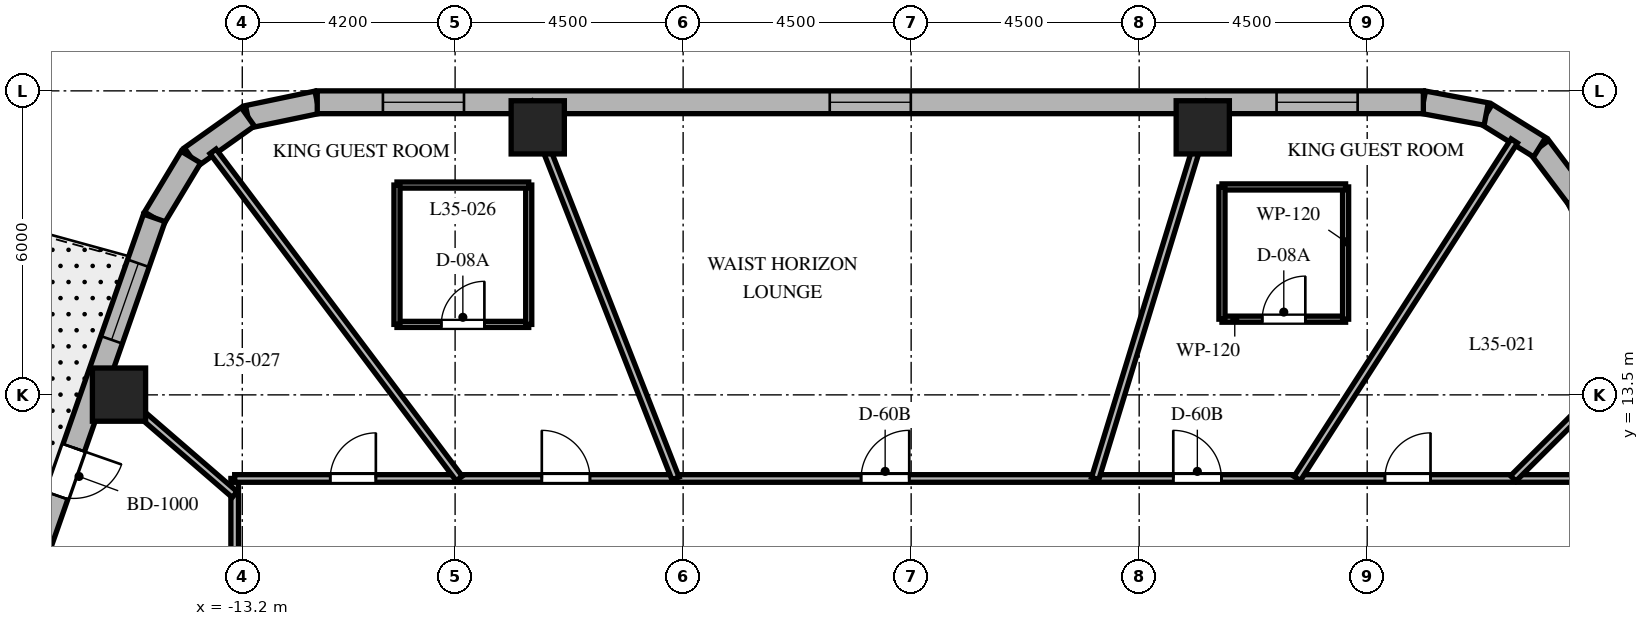
"""IFC4 building model, lengths in metres.
Left out: names, types, materials, properties, quantities, classifications, styles, units other than length and angle.
Written with IfcOpenShell. Run it as: python <this file> out.ifc"""

import sys

from ifc_helpers import new_model, si_unit, direction, frame, frame_2d, origin, origin_2d, place, context, subcontext, project, spatial, rectangle, extrude, element, fill, save


model = new_model("IFC4")
c1 = context("Model", 3, precision=1e-05, world=origin(), true_north=direction((0.0, 1.0)))
c2 = subcontext(c1, "Body", "Model", "MODEL_VIEW")
j1 = project(units=[si_unit("LENGTHUNIT", "METRE"), si_unit("PLANEANGLEUNIT", "RADIAN")], contexts=[c1])
p1 = place(None, origin())
s1 = spatial("IfcSite", under=j1, at=p1, CompositionType="ELEMENT")
p2 = place(p1, origin())
s2 = spatial("IfcBuilding", under=s1, at=p2, CompositionType="ELEMENT")
p3 = place(p2, frame((0.0, 0.0, 144.3)))
s3 = spatial("IfcBuildingStorey", under=s2, at=p3, CompositionType="ELEMENT", Elevation=144.3)
for number, where, z_axis, x_axis in (
    (1, (5.755, 18.78, 0.0), (0.0, 0.0, 1.0), (1.0, 0.0, 0.0)),
    (2, (-7.369, 18.78, 0.0), (0.0, 0.0, 1.0), (1.0, 0.0, 0.0)),
    (3, (-15.633, 13.505, 0.0), (0.0, 0.0, 1.0), (1.0, 0.0, 0.0)),
):
    element("IfcColumn", number, at=place(p3, frame(where, z_axis=z_axis, x_axis=x_axis)), inside=s3, PredefinedType="COLUMN", context=c2, shape_type="SweptSolid", body=[
        extrude(rectangle(XDim=1.05, YDim=1.05, at=origin_2d()), origin(), (0.0, 0.0, 1.0), 3.7),
    ])
p4 = place(p3, frame((13.162, 17.381, 0.0), z_axis=(0.0, 0.0, 1.0), x_axis=(-0.601515770517, 0.798860925205, 0.0)))
e4 = element("IfcWall", 4, at=p4, inside=s3, PredefinedType="SOLIDWALL", context=c2, shape_type="SweptSolid", body=[
    extrude(rectangle(XDim=1.262, YDim=0.45, at=frame_2d((0.631, 0.0))), origin(), (0.0, 0.0, 1.0), 3.4),
])
p5 = place(p3, frame((12.403, 18.389, 0.0), z_axis=(0.0, 0.0, 1.0), x_axis=(-0.849795170926, 0.527113049991, 0.0)))
e5 = element("IfcWall", 5, at=p5, inside=s3, PredefinedType="SOLIDWALL", context=c2, shape_type="SweptSolid", body=[
    extrude(rectangle(XDim=1.241, YDim=0.45, at=frame_2d((0.62, 0.0))), origin(), (0.0, 0.0, 1.0), 3.4),
])
p6 = place(p3, frame((11.349, 19.043, 0.0), z_axis=(0.0, 0.0, 1.0), x_axis=(-0.982931267051, 0.183973161772, 0.0)))
e6 = element("IfcWall", 6, at=p6, inside=s3, PredefinedType="SOLIDWALL", context=c2, shape_type="SweptSolid", body=[
    extrude(rectangle(XDim=1.262, YDim=0.45, at=frame_2d((0.631, 0.0))), origin(), (0.0, 0.0, 1.0), 3.4),
])
p7 = place(p3, frame((-11.72, 19.275, 0.0), z_axis=(0.0, 0.0, 1.0), x_axis=(-0.97893106758, -0.204191001093, 0.0)))
e7 = element("IfcWall", 7, at=p7, inside=s3, PredefinedType="SOLIDWALL", context=c2, shape_type="SweptSolid", body=[
    extrude(rectangle(XDim=1.4, YDim=0.45, at=frame_2d((0.7, 0.0))), origin(), (0.0, 0.0, 1.0), 3.4),
])
p8 = place(p3, frame((-13.091, 18.989, 0.0), z_axis=(0.0, 0.0, 1.0), x_axis=(-0.815574637848, -0.578651890258, 0.0)))
e8 = element("IfcWall", 8, at=p8, inside=s3, PredefinedType="SOLIDWALL", context=c2, shape_type="SweptSolid", body=[
    extrude(rectangle(XDim=1.377, YDim=0.45, at=frame_2d((0.688, 0.0))), origin(), (0.0, 0.0, 1.0), 3.4),
])
p9 = place(p3, frame((-14.214, 18.192, 0.0), z_axis=(0.0, 0.0, 1.0), x_axis=(-0.516340945502, -0.856383108193, 0.0)))
e9 = element("IfcWall", 9, at=p9, inside=s3, PredefinedType="SOLIDWALL", context=c2, shape_type="SweptSolid", body=[
    extrude(rectangle(XDim=1.4, YDim=0.45, at=frame_2d((0.7, 0.0))), origin(), (0.0, 0.0, 1.0), 3.4),
])
p10 = place(p3, frame((20.618, 2.344, 0.0), z_axis=(0.0, 0.0, 1.0), x_axis=(-0.444243691097, 0.895905990002, 0.0)))
e10 = element("IfcWall", 10, at=p10, inside=s3, PredefinedType="SOLIDWALL", context=c2, shape_type="SweptSolid", body=[
    extrude(rectangle(XDim=16.784, YDim=0.45, at=frame_2d((8.392, 0.0))), origin(), (0.0, 0.0, 1.0), 3.4),
])
p11 = place(p10, frame((4.535, 0.0, 0.0)))
e11 = element("IfcOpeningElement", 11, at=p11, cuts=e10, PredefinedType="OPENING", context=c2, shape_type="SweptSolid", body=[
    extrude(rectangle(XDim=1.0, YDim=2.15, at=frame_2d((0.5, 1.075))), frame((0.0, 0.235, 0.0), z_axis=(0.0, -1.0, 0.0), x_axis=(1.0, 0.0, 0.0)), (0.0, 0.0, 1.0), 0.47),
])
p12 = place(p10, frame((0.931, 0.0, 0.8)))
e12 = element("IfcOpeningElement", 12, at=p12, cuts=e10, PredefinedType="OPENING", context=c2, shape_type="SweptSolid", body=[
    extrude(rectangle(XDim=1.6, YDim=1.75, at=frame_2d((0.8, 0.875))), frame((0.0, 0.235, 0.0), z_axis=(0.0, -1.0, 0.0), x_axis=(1.0, 0.0, 0.0)), (0.0, 0.0, 1.0), 0.47),
])
p13 = place(p10, frame((6.25, 0.0, 0.8)))
e13 = element("IfcOpeningElement", 13, at=p13, cuts=e10, PredefinedType="OPENING", context=c2, shape_type="SweptSolid", body=[
    extrude(rectangle(XDim=1.6, YDim=1.75, at=frame_2d((0.8, 0.875))), frame((0.0, 0.235, 0.0), z_axis=(0.0, -1.0, 0.0), x_axis=(1.0, 0.0, 0.0)), (0.0, 0.0, 1.0), 0.47),
])
p14 = place(p10, frame((10.24, 0.0, 0.8)))
e14 = element("IfcOpeningElement", 14, at=p14, cuts=e10, PredefinedType="OPENING", context=c2, shape_type="SweptSolid", body=[
    extrude(rectangle(XDim=1.6, YDim=1.75, at=frame_2d((0.8, 0.875))), frame((0.0, 0.235, 0.0), z_axis=(0.0, -1.0, 0.0), x_axis=(1.0, 0.0, 0.0)), (0.0, 0.0, 1.0), 0.47),
])
p15 = place(p10, frame((14.303, 0.0, 0.8)))
e15 = element("IfcOpeningElement", 15, at=p15, cuts=e10, PredefinedType="OPENING", context=c2, shape_type="SweptSolid", body=[
    extrude(rectangle(XDim=1.6, YDim=1.75, at=frame_2d((0.8, 0.875))), frame((0.0, 0.235, 0.0), z_axis=(0.0, -1.0, 0.0), x_axis=(1.0, 0.0, 0.0)), (0.0, 0.0, 1.0), 0.47),
])
p16 = place(p3, frame((10.108, 19.275, 0.0), z_axis=(0.0, 0.0, 1.0), x_axis=(-1.0, 0.0, 0.0)))
e16 = element("IfcWall", 16, at=p16, inside=s3, PredefinedType="SOLIDWALL", context=c2, shape_type="SweptSolid", body=[
    extrude(rectangle(XDim=21.829, YDim=0.45, at=frame_2d((10.915, 0.0))), origin(), (0.0, 0.0, 1.0), 3.4),
])
p17 = place(p16, frame((1.297, 0.0, 0.8)))
e17 = element("IfcOpeningElement", 17, at=p17, cuts=e16, PredefinedType="OPENING", context=c2, shape_type="SweptSolid", body=[
    extrude(rectangle(XDim=1.6, YDim=1.75, at=frame_2d((0.8, 0.875))), frame((0.0, 0.235, 0.0), z_axis=(0.0, -1.0, 0.0), x_axis=(1.0, 0.0, 0.0)), (0.0, 0.0, 1.0), 0.47),
])
p18 = place(p16, frame((10.115, 0.0, 0.8)))
e18 = element("IfcOpeningElement", 18, at=p18, cuts=e16, PredefinedType="OPENING", context=c2, shape_type="SweptSolid", body=[
    extrude(rectangle(XDim=1.6, YDim=1.75, at=frame_2d((0.8, 0.875))), frame((0.0, 0.235, 0.0), z_axis=(0.0, -1.0, 0.0), x_axis=(1.0, 0.0, 0.0)), (0.0, 0.0, 1.0), 0.47),
])
p19 = place(p16, frame((18.933, 0.0, 0.8)))
e19 = element("IfcOpeningElement", 19, at=p19, cuts=e16, PredefinedType="OPENING", context=c2, shape_type="SweptSolid", body=[
    extrude(rectangle(XDim=1.6, YDim=1.75, at=frame_2d((0.8, 0.875))), frame((0.0, 0.235, 0.0), z_axis=(0.0, -1.0, 0.0), x_axis=(1.0, 0.0, 0.0)), (0.0, 0.0, 1.0), 0.47),
])
p20 = place(p3, frame((-14.937, 16.993, 0.0), z_axis=(0.0, 0.0, 1.0), x_axis=(-0.330431575061, -0.943829949834, 0.0)))
e20 = element("IfcWall", 20, at=p20, inside=s3, PredefinedType="SOLIDWALL", context=c2, shape_type="SweptSolid", body=[
    extrude(rectangle(XDim=17.689, YDim=0.45, at=frame_2d((8.844, 0.0))), origin(), (0.0, 0.0, 1.0), 3.4),
])
p21 = place(p20, frame((4.807, 0.0, 0.0)))
e21 = element("IfcOpeningElement", 21, at=p21, cuts=e20, PredefinedType="OPENING", context=c2, shape_type="SweptSolid", body=[
    extrude(rectangle(XDim=1.0, YDim=2.15, at=frame_2d((0.5, 1.075))), frame((0.0, 0.235, 0.0), z_axis=(0.0, -1.0, 0.0), x_axis=(1.0, 0.0, 0.0)), (0.0, 0.0, 1.0), 0.47),
])
p22 = place(p20, frame((0.95, 0.0, 0.8)))
e22 = element("IfcOpeningElement", 22, at=p22, cuts=e20, PredefinedType="OPENING", context=c2, shape_type="SweptSolid", body=[
    extrude(rectangle(XDim=1.6, YDim=1.75, at=frame_2d((0.8, 0.875))), frame((0.0, 0.235, 0.0), z_axis=(0.0, -1.0, 0.0), x_axis=(1.0, 0.0, 0.0)), (0.0, 0.0, 1.0), 0.47),
])
p23 = place(p20, frame((7.99, 0.0, 0.8)))
e23 = element("IfcOpeningElement", 23, at=p23, cuts=e20, PredefinedType="OPENING", context=c2, shape_type="SweptSolid", body=[
    extrude(rectangle(XDim=1.6, YDim=1.75, at=frame_2d((0.8, 0.875))), frame((0.0, 0.235, 0.0), z_axis=(0.0, -1.0, 0.0), x_axis=(1.0, 0.0, 0.0)), (0.0, 0.0, 1.0), 0.47),
])
p24 = place(p20, frame((15.084, 0.0, 0.8)))
e24 = element("IfcOpeningElement", 24, at=p24, cuts=e20, PredefinedType="OPENING", context=c2, shape_type="SweptSolid", body=[
    extrude(rectangle(XDim=1.6, YDim=1.75, at=frame_2d((0.8, 0.875))), frame((0.0, 0.235, 0.0), z_axis=(0.0, -1.0, 0.0), x_axis=(1.0, 0.0, 0.0)), (0.0, 0.0, 1.0), 0.47),
])
p25 = place(p3, frame((-13.35, -11.85, 0.0), z_axis=(0.0, 0.0, 1.0), x_axis=(0.0, 1.0, 0.0)))
e25 = element("IfcWall", 25, at=p25, inside=s3, PredefinedType="PARTITIONING", context=c2, shape_type="SweptSolid", body=[
    extrude(rectangle(XDim=23.7, YDim=0.15, at=frame_2d((11.85, 0.0))), origin(), (0.0, 0.0, 1.0), 2.84),
])
p26 = place(p25, frame((18.389, 0.0, 0.0)))
e26 = element("IfcOpeningElement", 26, at=p26, cuts=e25, PredefinedType="OPENING", context=c2, shape_type="SweptSolid", body=[
    extrude(rectangle(XDim=0.95, YDim=2.03, at=frame_2d((0.475, 1.015))), frame((0.0, 0.085, 0.0), z_axis=(0.0, -1.0, 0.0), x_axis=(1.0, 0.0, 0.0)), (0.0, 0.0, 1.0), 0.17),
])
p27 = place(p25, frame((12.315, 0.0, 0.0)))
e27 = element("IfcOpeningElement", 27, at=p27, cuts=e25, PredefinedType="OPENING", context=c2, shape_type="SweptSolid", body=[
    extrude(rectangle(XDim=0.9, YDim=2.03, at=frame_2d((0.45, 1.015))), frame((0.0, 0.085, 0.0), z_axis=(0.0, -1.0, 0.0), x_axis=(1.0, 0.0, 0.0)), (0.0, 0.0, 1.0), 0.17),
])
p28 = place(p25, frame((9.27, 0.0, 0.0)))
e28 = element("IfcOpeningElement", 28, at=p28, cuts=e25, PredefinedType="OPENING", context=c2, shape_type="SweptSolid", body=[
    extrude(rectangle(XDim=0.9, YDim=2.03, at=frame_2d((0.45, 1.015))), frame((0.0, 0.085, 0.0), z_axis=(0.0, -1.0, 0.0), x_axis=(1.0, 0.0, 0.0)), (0.0, 0.0, 1.0), 0.17),
])
p29 = place(p25, frame((3.765, 0.0, 0.0)))
e29 = element("IfcOpeningElement", 29, at=p29, cuts=e25, PredefinedType="OPENING", context=c2, shape_type="SweptSolid", body=[
    extrude(rectangle(XDim=0.9, YDim=2.03, at=frame_2d((0.45, 1.015))), frame((0.0, 0.085, 0.0), z_axis=(0.0, -1.0, 0.0), x_axis=(1.0, 0.0, 0.0)), (0.0, 0.0, 1.0), 0.17),
])
p30 = place(p3, frame((-13.35, 11.85, 0.0), z_axis=(0.0, 0.0, 1.0), x_axis=(1.0, 0.0, 0.0)))
e30 = element("IfcWall", 30, at=p30, inside=s3, PredefinedType="PARTITIONING", context=c2, shape_type="SweptSolid", body=[
    extrude(rectangle(XDim=26.7, YDim=0.15, at=frame_2d((13.35, 0.0))), origin(), (0.0, 0.0, 1.0), 2.84),
])
p31 = place(p30, frame((22.7, 0.0, 0.0)))
e31 = element("IfcOpeningElement", 31, at=p31, cuts=e30, PredefinedType="OPENING", context=c2, shape_type="SweptSolid", body=[
    extrude(rectangle(XDim=0.9, YDim=2.03, at=frame_2d((0.45, 1.015))), frame((0.0, 0.085, 0.0), z_axis=(0.0, -1.0, 0.0), x_axis=(1.0, 0.0, 0.0)), (0.0, 0.0, 1.0), 0.17),
])
p32 = place(p30, frame((18.523, 0.0, 0.0)))
e32 = element("IfcOpeningElement", 32, at=p32, cuts=e30, PredefinedType="OPENING", context=c2, shape_type="SweptSolid", body=[
    extrude(rectangle(XDim=0.95, YDim=2.03, at=frame_2d((0.475, 1.015))), frame((0.0, 0.085, 0.0), z_axis=(0.0, -1.0, 0.0), x_axis=(1.0, 0.0, 0.0)), (0.0, 0.0, 1.0), 0.17),
])
p33 = place(p30, frame((12.362, 0.0, 0.0)))
e33 = element("IfcOpeningElement", 33, at=p33, cuts=e30, PredefinedType="OPENING", context=c2, shape_type="SweptSolid", body=[
    extrude(rectangle(XDim=0.95, YDim=2.03, at=frame_2d((0.475, 1.015))), frame((0.0, 0.085, 0.0), z_axis=(0.0, -1.0, 0.0), x_axis=(1.0, 0.0, 0.0)), (0.0, 0.0, 1.0), 0.17),
])
p34 = place(p30, frame((6.061, 0.0, 0.0)))
e34 = element("IfcOpeningElement", 34, at=p34, cuts=e30, PredefinedType="OPENING", context=c2, shape_type="SweptSolid", body=[
    extrude(rectangle(XDim=0.95, YDim=2.03, at=frame_2d((0.475, 1.015))), frame((0.0, 0.085, 0.0), z_axis=(0.0, -1.0, 0.0), x_axis=(1.0, 0.0, 0.0)), (0.0, 0.0, 1.0), 0.17),
])
p35 = place(p30, frame((1.886, 0.0, 0.0)))
e35 = element("IfcOpeningElement", 35, at=p35, cuts=e30, PredefinedType="OPENING", context=c2, shape_type="SweptSolid", body=[
    extrude(rectangle(XDim=0.9, YDim=2.03, at=frame_2d((0.45, 1.015))), frame((0.0, 0.085, 0.0), z_axis=(0.0, -1.0, 0.0), x_axis=(1.0, 0.0, 0.0)), (0.0, 0.0, 1.0), 0.17),
])
p36 = place(p3, frame((11.882, 11.85, 0.0), z_axis=(0.0, 0.0, 1.0), x_axis=(0.708037373639, 0.706174962407, 0.0)))
e36 = element("IfcWall", 36, at=p36, inside=s3, PredefinedType="PARTITIONING", context=c2, shape_type="SweptSolid", body=[
    extrude(rectangle(XDim=3.802, YDim=0.15, at=frame_2d((1.901, 0.0))), origin(), (0.0, 0.0, 1.0), 2.64),
])
p37 = place(p3, frame((7.619, 11.85, 0.0), z_axis=(0.0, 0.0, 1.0), x_axis=(0.540829263478, 0.841132396098, 0.0)))
e37 = element("IfcWall", 37, at=p37, inside=s3, PredefinedType="PARTITIONING", context=c2, shape_type="SweptSolid", body=[
    extrude(rectangle(XDim=7.919, YDim=0.15, at=frame_2d((3.959, 0.0))), origin(), (0.0, 0.0, 1.0), 2.64),
])
p38 = place(p3, frame((3.631, 11.85, 0.0), z_axis=(0.0, 0.0, 1.0), x_axis=(0.293007573338, 0.956110120209, 0.0)))
e38 = element("IfcWall", 38, at=p38, inside=s3, PredefinedType="PARTITIONING", context=c2, shape_type="SweptSolid", body=[
    extrude(rectangle(XDim=7.766, YDim=0.15, at=frame_2d((3.883, 0.0))), origin(), (0.0, 0.0, 1.0), 2.64),
])
p39 = place(p3, frame((-4.65, 11.85, 0.0), z_axis=(0.0, 0.0, 1.0), x_axis=(-0.365265947993, 0.930903210456, 0.0)))
e39 = element("IfcWall", 39, at=p39, inside=s3, PredefinedType="PARTITIONING", context=c2, shape_type="SweptSolid", body=[
    extrude(rectangle(XDim=7.976, YDim=0.15, at=frame_2d((3.988, 0.0))), origin(), (0.0, 0.0, 1.0), 2.64),
])
p40 = place(p3, frame((-8.918, 11.85, 0.0), z_axis=(0.0, 0.0, 1.0), x_axis=(-0.601347965064, 0.798987249531, 0.0)))
e40 = element("IfcWall", 40, at=p40, inside=s3, PredefinedType="PARTITIONING", context=c2, shape_type="SweptSolid", body=[
    extrude(rectangle(XDim=8.08, YDim=0.15, at=frame_2d((4.04, 0.0))), origin(), (0.0, 0.0, 1.0), 2.64),
])
p41 = place(p3, frame((-13.35, 11.533, 0.0), z_axis=(0.0, 0.0, 1.0), x_axis=(-0.756711647314, 0.65374879183, 0.0)))
e41 = element("IfcWall", 41, at=p41, inside=s3, PredefinedType="PARTITIONING", context=c2, shape_type="SweptSolid", body=[
    extrude(rectangle(XDim=3.55, YDim=0.15, at=frame_2d((1.775, 0.0))), origin(), (0.0, 0.0, 1.0), 2.64),
])
p42 = place(p3, frame((6.134, 14.994, 0.0), z_axis=(0.0, 0.0, 1.0), x_axis=(1.0, 0.0, 0.0)))
e42 = element("IfcWall", 42, at=p42, inside=s3, PredefinedType="PARTITIONING", context=c2, shape_type="SweptSolid", body=[
    extrude(rectangle(XDim=2.44, YDim=0.12, at=frame_2d((1.22, 0.0))), origin(), (0.0, 0.0, 1.0), 3.4),
])
p43 = place(p42, frame((0.795, 0.0, 0.0)))
e43 = element("IfcOpeningElement", 43, at=p43, cuts=e42, PredefinedType="OPENING", context=c2, shape_type="SweptSolid", body=[
    extrude(rectangle(XDim=0.85, YDim=2.03, at=frame_2d((0.425, 1.015))), frame((0.0, 0.07, 0.0), z_axis=(0.0, -1.0, 0.0), x_axis=(1.0, 0.0, 0.0)), (0.0, 0.0, 1.0), 0.14),
])
p44 = place(p3, frame((8.574, 14.994, 0.0), z_axis=(0.0, 0.0, 1.0), x_axis=(0.0, 1.0, 0.0)))
e44 = element("IfcWall", 44, at=p44, inside=s3, PredefinedType="PARTITIONING", context=c2, shape_type="SweptSolid", body=[
    extrude(rectangle(XDim=2.61, YDim=0.12, at=frame_2d((1.305, 0.0))), origin(), (0.0, 0.0, 1.0), 2.64),
])
p45 = place(p3, frame((8.574, 17.604, 0.0), z_axis=(0.0, 0.0, 1.0), x_axis=(-1.0, 0.0, 0.0)))
e45 = element("IfcWall", 45, at=p45, inside=s3, PredefinedType="PARTITIONING", context=c2, shape_type="SweptSolid", body=[
    extrude(rectangle(XDim=2.44, YDim=0.12, at=frame_2d((1.22, 0.0))), origin(), (0.0, 0.0, 1.0), 2.64),
])
p46 = place(p3, frame((6.134, 17.604, 0.0), z_axis=(0.0, 0.0, 1.0), x_axis=(0.0, -1.0, 0.0)))
e46 = element("IfcWall", 46, at=p46, inside=s3, PredefinedType="PARTITIONING", context=c2, shape_type="SweptSolid", body=[
    extrude(rectangle(XDim=2.61, YDim=0.12, at=frame_2d((1.305, 0.0))), origin(), (0.0, 0.0, 1.0), 3.4),
])
p47 = place(p3, frame((-10.147, 14.891, 0.0), z_axis=(0.0, 0.0, 1.0), x_axis=(1.0, 0.0, 0.0)))
e47 = element("IfcWall", 47, at=p47, inside=s3, PredefinedType="PARTITIONING", context=c2, shape_type="SweptSolid", body=[
    extrude(rectangle(XDim=2.6, YDim=0.12, at=frame_2d((1.3, 0.0))), origin(), (0.0, 0.0, 1.0), 2.84),
])
p48 = place(p47, frame((0.875, 0.0, 0.0)))
e48 = element("IfcOpeningElement", 48, at=p48, cuts=e47, PredefinedType="OPENING", context=c2, shape_type="SweptSolid", body=[
    extrude(rectangle(XDim=0.85, YDim=2.03, at=frame_2d((0.425, 1.015))), frame((0.0, 0.07, 0.0), z_axis=(0.0, -1.0, 0.0), x_axis=(1.0, 0.0, 0.0)), (0.0, 0.0, 1.0), 0.14),
])
p49 = place(p3, frame((-7.547, 14.891, 0.0), z_axis=(0.0, 0.0, 1.0), x_axis=(0.0, 1.0, 0.0)))
e49 = element("IfcWall", 49, at=p49, inside=s3, PredefinedType="PARTITIONING", context=c2, shape_type="SweptSolid", body=[
    extrude(rectangle(XDim=2.75, YDim=0.12, at=frame_2d((1.375, 0.0))), origin(), (0.0, 0.0, 1.0), 2.84),
])
p50 = place(p3, frame((-7.547, 17.641, 0.0), z_axis=(0.0, 0.0, 1.0), x_axis=(-1.0, 0.0, 0.0)))
e50 = element("IfcWall", 50, at=p50, inside=s3, PredefinedType="PARTITIONING", context=c2, shape_type="SweptSolid", body=[
    extrude(rectangle(XDim=2.6, YDim=0.12, at=frame_2d((1.3, 0.0))), origin(), (0.0, 0.0, 1.0), 2.64),
])
p51 = place(p3, frame((-10.147, 17.641, 0.0), z_axis=(0.0, 0.0, 1.0), x_axis=(0.0, -1.0, 0.0)))
e51 = element("IfcWall", 51, at=p51, inside=s3, PredefinedType="PARTITIONING", context=c2, shape_type="SweptSolid", body=[
    extrude(rectangle(XDim=2.75, YDim=0.12, at=frame_2d((1.375, 0.0))), origin(), (0.0, 0.0, 1.0), 2.64),
])
p52 = place(p17, origin())
e52 = element("IfcWindow", 52, at=p52, inside=s3, PartitioningType="SINGLE_PANEL", PredefinedType="WINDOW", context=c2, shape_type="SweptSolid", body=[
    extrude(rectangle(XDim=1.6, YDim=1.75, at=frame_2d((0.8, 0.875))), frame((0.0, 0.03, 0.0), z_axis=(0.0, -1.0, 0.0), x_axis=(1.0, 0.0, 0.0)), (0.0, 0.0, 1.0), 0.06),
])
fill(e17, e52)
p53 = place(p18, origin())
e53 = element("IfcWindow", 53, at=p53, inside=s3, PartitioningType="SINGLE_PANEL", PredefinedType="WINDOW", context=c2, shape_type="SweptSolid", body=[
    extrude(rectangle(XDim=1.6, YDim=1.75, at=frame_2d((0.8, 0.875))), frame((0.0, 0.03, 0.0), z_axis=(0.0, -1.0, 0.0), x_axis=(1.0, 0.0, 0.0)), (0.0, 0.0, 1.0), 0.06),
])
fill(e18, e53)
p54 = place(p19, origin())
e54 = element("IfcWindow", 54, at=p54, inside=s3, PartitioningType="SINGLE_PANEL", PredefinedType="WINDOW", context=c2, shape_type="SweptSolid", body=[
    extrude(rectangle(XDim=1.6, YDim=1.75, at=frame_2d((0.8, 0.875))), frame((0.0, 0.03, 0.0), z_axis=(0.0, -1.0, 0.0), x_axis=(1.0, 0.0, 0.0)), (0.0, 0.0, 1.0), 0.06),
])
fill(e19, e54)
p55 = place(p21, origin())
e55 = element("IfcDoor", 55, at=p55, inside=s3, OperationType="SINGLE_SWING_LEFT", PredefinedType="DOOR", context=c2, shape_type="SweptSolid", body=[
    extrude(rectangle(XDim=1.0, YDim=2.15, at=frame_2d((0.5, 1.075))), frame((0.0, 0.025, 0.0), z_axis=(0.0, -1.0, 0.0), x_axis=(1.0, 0.0, 0.0)), (0.0, 0.0, 1.0), 0.05),
])
fill(e21, e55)
p56 = place(p22, origin())
e56 = element("IfcWindow", 56, at=p56, inside=s3, PartitioningType="SINGLE_PANEL", PredefinedType="WINDOW", context=c2, shape_type="SweptSolid", body=[
    extrude(rectangle(XDim=1.6, YDim=1.75, at=frame_2d((0.8, 0.875))), frame((0.0, 0.03, 0.0), z_axis=(0.0, -1.0, 0.0), x_axis=(1.0, 0.0, 0.0)), (0.0, 0.0, 1.0), 0.06),
])
fill(e22, e56)
p57 = place(p31, origin())
e57 = element("IfcDoor", 57, at=p57, inside=s3, OperationType="SINGLE_SWING_RIGHT", PredefinedType="DOOR", context=c2, shape_type="SweptSolid", body=[
    extrude(rectangle(XDim=0.9, YDim=2.03, at=frame_2d((0.45, 1.015))), frame((0.0, 0.025, 0.0), z_axis=(0.0, -1.0, 0.0), x_axis=(1.0, 0.0, 0.0)), (0.0, 0.0, 1.0), 0.05),
])
fill(e31, e57)
p58 = place(p32, origin())
e58 = element("IfcDoor", 58, at=p58, inside=s3, OperationType="SINGLE_SWING_LEFT", PredefinedType="DOOR", context=c2, shape_type="SweptSolid", body=[
    extrude(rectangle(XDim=0.95, YDim=2.03, at=frame_2d((0.475, 1.015))), frame((0.0, 0.025, 0.0), z_axis=(0.0, -1.0, 0.0), x_axis=(1.0, 0.0, 0.0)), (0.0, 0.0, 1.0), 0.05),
])
fill(e32, e58)
p59 = place(p43, origin())
e59 = element("IfcDoor", 59, at=p59, inside=s3, OperationType="SINGLE_SWING_RIGHT", PredefinedType="DOOR", context=c2, shape_type="SweptSolid", body=[
    extrude(rectangle(XDim=0.85, YDim=2.03, at=frame_2d((0.425, 1.015))), frame((0.0, 0.025, 0.0), z_axis=(0.0, -1.0, 0.0), x_axis=(1.0, 0.0, 0.0)), (0.0, 0.0, 1.0), 0.05),
])
fill(e43, e59)
p60 = place(p33, origin())
e60 = element("IfcDoor", 60, at=p60, inside=s3, OperationType="SINGLE_SWING_RIGHT", PredefinedType="DOOR", context=c2, shape_type="SweptSolid", body=[
    extrude(rectangle(XDim=0.95, YDim=2.03, at=frame_2d((0.475, 1.015))), frame((0.0, 0.025, 0.0), z_axis=(0.0, -1.0, 0.0), x_axis=(1.0, 0.0, 0.0)), (0.0, 0.0, 1.0), 0.05),
])
fill(e33, e60)
p61 = place(p34, origin())
e61 = element("IfcDoor", 61, at=p61, inside=s3, OperationType="SINGLE_SWING_LEFT", PredefinedType="DOOR", context=c2, shape_type="SweptSolid", body=[
    extrude(rectangle(XDim=0.95, YDim=2.03, at=frame_2d((0.475, 1.015))), frame((0.0, 0.025, 0.0), z_axis=(0.0, -1.0, 0.0), x_axis=(1.0, 0.0, 0.0)), (0.0, 0.0, 1.0), 0.05),
])
fill(e34, e61)
p62 = place(p48, origin())
e62 = element("IfcDoor", 62, at=p62, inside=s3, OperationType="SINGLE_SWING_RIGHT", PredefinedType="DOOR", context=c2, shape_type="SweptSolid", body=[
    extrude(rectangle(XDim=0.85, YDim=2.03, at=frame_2d((0.425, 1.015))), frame((0.0, 0.025, 0.0), z_axis=(0.0, -1.0, 0.0), x_axis=(1.0, 0.0, 0.0)), (0.0, 0.0, 1.0), 0.05),
])
fill(e48, e62)
p63 = place(p35, origin())
e63 = element("IfcDoor", 63, at=p63, inside=s3, OperationType="SINGLE_SWING_RIGHT", PredefinedType="DOOR", context=c2, shape_type="SweptSolid", body=[
    extrude(rectangle(XDim=0.9, YDim=2.03, at=frame_2d((0.45, 1.015))), frame((0.0, 0.025, 0.0), z_axis=(0.0, -1.0, 0.0), x_axis=(1.0, 0.0, 0.0)), (0.0, 0.0, 1.0), 0.05),
])
fill(e35, e63)
save(model, sys.argv[1])
